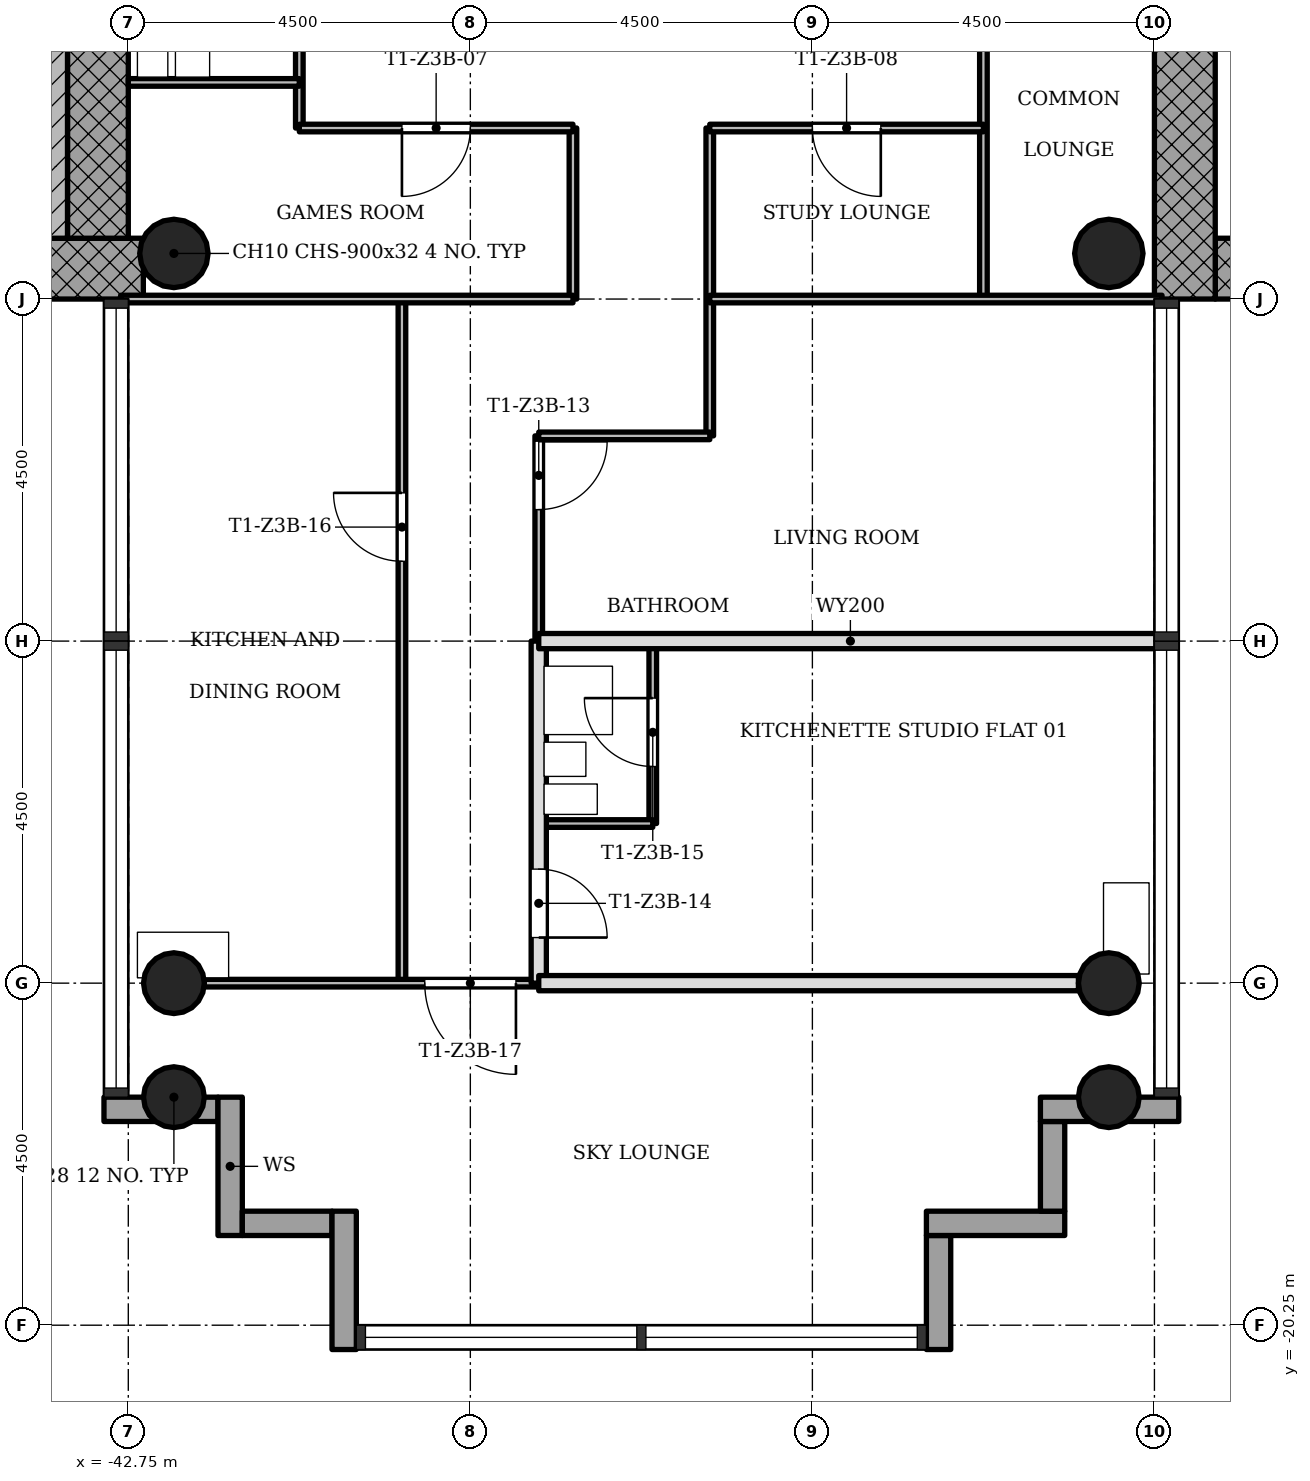
"""IFC4 building model, lengths in metres.
Left out: names, types, materials, properties, quantities, classifications, styles, units other than length and angle.
Written with IfcOpenShell. Run it as: python <this file> out.ifc"""

import sys

from ifc_helpers import new_model, si_unit, direction, frame, frame_2d, origin, origin_2d, place, context, subcontext, project, spatial, rectangle, hollow_circle, extrude, element, fill, save


model = new_model("IFC4")
c1 = context("Model", 3, precision=1e-05, world=origin(), true_north=direction((0.0, 1.0)))
c2 = subcontext(c1, "Body", "Model", "MODEL_VIEW")
j1 = project(units=[si_unit("LENGTHUNIT", "METRE"), si_unit("PLANEANGLEUNIT", "RADIAN")], contexts=[c1])
p1 = place(None, origin())
s1 = spatial("IfcSite", under=j1, at=p1, CompositionType="ELEMENT")
p2 = place(p1, origin())
s2 = spatial("IfcBuilding", under=s1, at=p2, CompositionType="ELEMENT")
p3 = place(p2, frame((0.0, 0.0, 147.3)))
s3 = spatial("IfcBuildingStorey", under=s2, at=p3, CompositionType="ELEMENT", Elevation=147.3)
p4 = place(p3, frame((-28.45, -6.35, 0.0), z_axis=(0.0, 0.0, 1.0), x_axis=(1.0, 0.0, 0.0)))
e1 = element("IfcWall", 1, at=p4, inside=s3, PredefinedType="SHEAR", context=c2, shape_type="SweptSolid", body=[
    extrude(rectangle(XDim=8.2, YDim=0.8, at=frame_2d((4.1, 0.0))), origin(), (0.0, 0.0, 1.0), 3.4),
])
p5 = place(p3, frame((-28.85, 5.95, 0.0), z_axis=(0.0, 0.0, 1.0), x_axis=(0.0, -1.0, 0.0)))
e2 = element("IfcWall", 2, at=p5, inside=s3, PredefinedType="SHEAR", context=c2, shape_type="SweptSolid", body=[
    extrude(rectangle(XDim=12.7, YDim=0.8, at=frame_2d((6.35, 0.0))), origin(), (0.0, 0.0, 1.0), 3.4),
])
p6 = place(p5, frame((5.05, 0.0, 0.0)))
e3 = element("IfcOpeningElement", 3, at=p6, cuts=e2, PredefinedType="OPENING", context=c2, shape_type="SweptSolid", body=[
    extrude(rectangle(XDim=1.8, YDim=2.1, at=frame_2d((0.9, 1.05))), frame((0.0, 0.41, 0.0), z_axis=(0.0, -1.0, 0.0), x_axis=(1.0, 0.0, 0.0)), (0.0, 0.0, 1.0), 0.82),
])
p7 = place(p3, frame((-50.95, -6.35, 0.0), z_axis=(0.0, 0.0, 1.0), x_axis=(1.0, 0.0, 0.0)))
e4 = element("IfcWall", 4, at=p7, inside=s3, PredefinedType="SHEAR", context=c2, shape_type="SweptSolid", body=[
    extrude(rectangle(XDim=8.398, YDim=0.8, at=frame_2d((4.199, 0.0))), origin(), (0.0, 0.0, 1.0), 3.4),
])
p8 = place(p3, frame((-43.15, -5.95, 0.0), z_axis=(0.0, 0.0, 1.0), x_axis=(0.0, 1.0, 0.0)))
e5 = element("IfcWall", 5, at=p8, inside=s3, PredefinedType="SHEAR", context=c2, shape_type="SweptSolid", body=[
    extrude(rectangle(XDim=12.7, YDim=0.8, at=frame_2d((6.35, 0.0))), origin(), (0.0, 0.0, 1.0), 3.4),
])
p9 = place(p8, frame((5.05, 0.0, 0.0)))
e6 = element("IfcOpeningElement", 6, at=p9, cuts=e5, PredefinedType="OPENING", context=c2, shape_type="SweptSolid", body=[
    extrude(rectangle(XDim=1.8, YDim=2.1, at=frame_2d((0.9, 1.05))), frame((0.0, 0.41, 0.0), z_axis=(0.0, -1.0, 0.0), x_axis=(1.0, 0.0, 0.0)), (0.0, 0.0, 1.0), 0.82),
])
for number, where, z_axis, x_axis in (
    (7, (-42.15, -15.75, 0.0), (0.0, 0.0, 1.0), (1.0, 0.0, 0.0)),
    (8, (-29.85, -15.75, 0.0), (0.0, 0.0, 1.0), (1.0, 0.0, 0.0)),
    (9, (-42.15, -17.25, 0.0), (0.0, 0.0, 1.0), (1.0, 0.0, 0.0)),
    (10, (-29.85, -17.25, 0.0), (0.0, 0.0, 1.0), (1.0, 0.0, 0.0)),
):
    element("IfcColumn", number, at=place(p3, frame(where, z_axis=z_axis, x_axis=x_axis)), inside=s3, PredefinedType="COLUMN", context=c2, shape_type="SweptSolid", body=[
        extrude(hollow_circle(Radius=0.4, WallThickness=0.028, at=origin_2d()), origin(), (0.0, 0.0, 1.0), 3.4),
    ])
for number, where, z_axis, x_axis in (
    (11, (-42.15, -6.15, 0.0), (0.0, 0.0, 1.0), (1.0, 0.0, 0.0)),
    (12, (-29.85, -6.15, 0.0), (0.0, 0.0, 1.0), (1.0, 0.0, 0.0)),
):
    element("IfcColumn", number, at=place(p3, frame(where, z_axis=z_axis, x_axis=x_axis)), inside=s3, PredefinedType="COLUMN", context=c2, shape_type="SweptSolid", body=[
        extrude(hollow_circle(Radius=0.45, WallThickness=0.032, at=origin_2d()), origin(), (0.0, 0.0, 1.0), 3.4),
    ])
p10 = place(p3, frame((-43.07, -17.41, -0.3), z_axis=(0.0, 0.0, 1.0), x_axis=(1.0, 0.0, 0.0)))
e13 = element("IfcWall", 13, at=p10, inside=s3, PredefinedType="STANDARD", context=c2, shape_type="SweptSolid", body=[
    extrude(rectangle(XDim=1.5, YDim=0.32, at=frame_2d((0.75, 0.0))), origin(), (0.0, 0.0, 1.0), 3.4),
])
p11 = place(p3, frame((-41.41, -17.25, -0.3), z_axis=(0.0, 0.0, 1.0), x_axis=(0.0, -1.0, 0.0)))
e14 = element("IfcWall", 14, at=p11, inside=s3, PredefinedType="STANDARD", context=c2, shape_type="SweptSolid", body=[
    extrude(rectangle(XDim=1.82, YDim=0.32, at=frame_2d((0.91, 0.0))), origin(), (0.0, 0.0, 1.0), 3.4),
])
p12 = place(p3, frame((-41.25, -18.91, -0.3), z_axis=(0.0, 0.0, 1.0), x_axis=(1.0, 0.0, 0.0)))
e15 = element("IfcWall", 15, at=p12, inside=s3, PredefinedType="STANDARD", context=c2, shape_type="SweptSolid", body=[
    extrude(rectangle(XDim=1.18, YDim=0.32, at=frame_2d((0.59, 0.0))), origin(), (0.0, 0.0, 1.0), 3.4),
])
p13 = place(p3, frame((-39.91, -18.75, -0.3), z_axis=(0.0, 0.0, 1.0), x_axis=(0.0, -1.0, 0.0)))
e16 = element("IfcWall", 16, at=p13, inside=s3, PredefinedType="STANDARD", context=c2, shape_type="SweptSolid", body=[
    extrude(rectangle(XDim=1.82, YDim=0.32, at=frame_2d((0.91, 0.0))), origin(), (0.0, 0.0, 1.0), 3.4),
])
p14 = place(p3, frame((-32.09, -20.57, -0.3), z_axis=(0.0, 0.0, 1.0), x_axis=(0.0, 1.0, 0.0)))
e17 = element("IfcWall", 17, at=p14, inside=s3, PredefinedType="STANDARD", context=c2, shape_type="SweptSolid", body=[
    extrude(rectangle(XDim=1.5, YDim=0.32, at=frame_2d((0.75, 0.0))), origin(), (0.0, 0.0, 1.0), 3.4),
])
p15 = place(p3, frame((-32.25, -18.91, -0.3), z_axis=(0.0, 0.0, 1.0), x_axis=(1.0, 0.0, 0.0)))
e18 = element("IfcWall", 18, at=p15, inside=s3, PredefinedType="STANDARD", context=c2, shape_type="SweptSolid", body=[
    extrude(rectangle(XDim=1.82, YDim=0.32, at=frame_2d((0.91, 0.0))), origin(), (0.0, 0.0, 1.0), 3.4),
])
p16 = place(p3, frame((-30.59, -18.75, -0.3), z_axis=(0.0, 0.0, 1.0), x_axis=(0.0, 1.0, 0.0)))
e19 = element("IfcWall", 19, at=p16, inside=s3, PredefinedType="STANDARD", context=c2, shape_type="SweptSolid", body=[
    extrude(rectangle(XDim=1.18, YDim=0.32, at=frame_2d((0.59, 0.0))), origin(), (0.0, 0.0, 1.0), 3.4),
])
p17 = place(p3, frame((-30.75, -17.41, -0.3), z_axis=(0.0, 0.0, 1.0), x_axis=(1.0, 0.0, 0.0)))
e20 = element("IfcWall", 20, at=p17, inside=s3, PredefinedType="STANDARD", context=c2, shape_type="SweptSolid", body=[
    extrude(rectangle(XDim=1.82, YDim=0.32, at=frame_2d((0.91, 0.0))), origin(), (0.0, 0.0, 1.0), 3.4),
])
p18 = place(p3, frame((-40.5, -4.5, 0.0), z_axis=(0.0, 0.0, 1.0), x_axis=(0.0, 1.0, 0.0)))
e21 = element("IfcWall", 21, at=p18, inside=s3, PredefinedType="PARTITIONING", context=c2, shape_type="SweptSolid", body=[
    extrude(rectangle(XDim=3.0, YDim=0.1, at=frame_2d((1.5, 0.0))), origin(), (0.0, 0.0, 1.0), 3.0),
])
p19 = place(p3, frame((-39.15, -15.75, 0.0), z_axis=(0.0, 0.0, 1.0), x_axis=(0.0, 1.0, 0.0)))
e22 = element("IfcWall", 22, at=p19, inside=s3, PredefinedType="PARTITIONING", context=c2, shape_type="SweptSolid", body=[
    extrude(rectangle(XDim=9.0, YDim=0.1, at=frame_2d((4.5, 0.0))), origin(), (0.0, 0.0, 1.0), 3.0),
])
p20 = place(p19, frame((5.55, 0.0, 0.0)))
e23 = element("IfcOpeningElement", 23, at=p20, cuts=e22, PredefinedType="OPENING", context=c2, shape_type="SweptSolid", body=[
    extrude(rectangle(XDim=0.9, YDim=2.1, at=frame_2d((0.45, 1.05))), frame((0.0, 0.06, 0.0), z_axis=(0.0, -1.0, 0.0), x_axis=(1.0, 0.0, 0.0)), (0.0, 0.0, 1.0), 0.12),
])
p21 = place(p3, frame((-37.35, -11.25, 0.0), z_axis=(0.0, 0.0, 1.0), x_axis=(0.0, 1.0, 0.0)))
e24 = element("IfcWall", 24, at=p21, inside=s3, PredefinedType="PARTITIONING", context=c2, shape_type="SweptSolid", body=[
    extrude(rectangle(XDim=2.7, YDim=0.1, at=frame_2d((1.35, 0.0))), origin(), (0.0, 0.0, 1.0), 3.0),
])
p22 = place(p21, frame((1.73, 0.0, 0.0)))
e25 = element("IfcOpeningElement", 25, at=p22, cuts=e24, PredefinedType="OPENING", context=c2, shape_type="SweptSolid", body=[
    extrude(rectangle(XDim=0.9, YDim=2.1, at=frame_2d((0.45, 1.05))), frame((0.0, 0.06, 0.0), z_axis=(0.0, -1.0, 0.0), x_axis=(1.0, 0.0, 0.0)), (0.0, 0.0, 1.0), 0.12),
])
p23 = place(p3, frame((-37.35, -15.75, 0.0), z_axis=(0.0, 0.0, 1.0), x_axis=(0.0, 1.0, 0.0)))
e26 = element("IfcWall", 26, at=p23, inside=s3, PredefinedType="SOLIDWALL", context=c2, shape_type="SweptSolid", body=[
    extrude(rectangle(XDim=4.5, YDim=0.2, at=frame_2d((2.25, 0.0))), origin(), (0.0, 0.0, 1.0), 3.0),
])
p24 = place(p23, frame((0.6, 0.0, 0.0)))
e27 = element("IfcOpeningElement", 27, at=p24, cuts=e26, PredefinedType="OPENING", context=c2, shape_type="SweptSolid", body=[
    extrude(rectangle(XDim=0.9, YDim=2.1, at=frame_2d((0.45, 1.05))), frame((0.0, 0.11, 0.0), z_axis=(0.0, -1.0, 0.0), x_axis=(1.0, 0.0, 0.0)), (0.0, 0.0, 1.0), 0.22),
])
p25 = place(p3, frame((-36.9, -6.75, 0.0), z_axis=(0.0, 0.0, 1.0), x_axis=(0.0, 1.0, 0.0)))
e28 = element("IfcWall", 28, at=p25, inside=s3, PredefinedType="PARTITIONING", context=c2, shape_type="SweptSolid", body=[
    extrude(rectangle(XDim=2.25, YDim=0.1, at=frame_2d((1.125, 0.0))), origin(), (0.0, 0.0, 1.0), 3.0),
])
p26 = place(p3, frame((-35.85, -13.65, 0.0), z_axis=(0.0, 0.0, 1.0), x_axis=(0.0, 1.0, 0.0)))
e29 = element("IfcWall", 29, at=p26, inside=s3, PredefinedType="PARTITIONING", context=c2, shape_type="SweptSolid", body=[
    extrude(rectangle(XDim=2.4, YDim=0.1, at=frame_2d((1.2, 0.0))), origin(), (0.0, 0.0, 1.0), 3.0),
])
p27 = place(p26, frame((0.75, 0.0, 0.0)))
e30 = element("IfcOpeningElement", 30, at=p27, cuts=e29, PredefinedType="OPENING", context=c2, shape_type="SweptSolid", body=[
    extrude(rectangle(XDim=0.9, YDim=2.1, at=frame_2d((0.45, 1.05))), frame((0.0, 0.06, 0.0), z_axis=(0.0, -1.0, 0.0), x_axis=(1.0, 0.0, 0.0)), (0.0, 0.0, 1.0), 0.12),
])
p28 = place(p3, frame((-35.1, -8.55, 0.0), z_axis=(0.0, 0.0, 1.0), x_axis=(0.0, 1.0, 0.0)))
e31 = element("IfcWall", 31, at=p28, inside=s3, PredefinedType="PARTITIONING", context=c2, shape_type="SweptSolid", body=[
    extrude(rectangle(XDim=4.05, YDim=0.1, at=frame_2d((2.025, 0.0))), origin(), (0.0, 0.0, 1.0), 3.0),
])
p29 = place(p3, frame((-31.5, -6.75, 0.0), z_axis=(0.0, 0.0, 1.0), x_axis=(0.0, 1.0, 0.0)))
e32 = element("IfcWall", 32, at=p29, inside=s3, PredefinedType="PARTITIONING", context=c2, shape_type="SweptSolid", body=[
    extrude(rectangle(XDim=5.25, YDim=0.1, at=frame_2d((2.625, 0.0))), origin(), (0.0, 0.0, 1.0), 3.0),
])
p30 = place(p29, frame((3.3, 0.0, 0.0)))
e33 = element("IfcOpeningElement", 33, at=p30, cuts=e32, PredefinedType="OPENING", context=c2, shape_type="SweptSolid", body=[
    extrude(rectangle(XDim=0.9, YDim=2.1, at=frame_2d((0.45, 1.05))), frame((0.0, 0.06, 0.0), z_axis=(0.0, -1.0, 0.0), x_axis=(1.0, 0.0, 0.0)), (0.0, 0.0, 1.0), 0.12),
])
p31 = place(p3, frame((-41.75, -15.75, 0.0), z_axis=(0.0, 0.0, 1.0), x_axis=(1.0, 0.0, 0.0)))
e34 = element("IfcWall", 34, at=p31, inside=s3, PredefinedType="PARTITIONING", context=c2, shape_type="SweptSolid", body=[
    extrude(rectangle(XDim=4.4, YDim=0.1, at=frame_2d((2.2, 0.0))), origin(), (0.0, 0.0, 1.0), 3.0),
])
p32 = place(p31, frame((2.9, 0.0, 0.0)))
e35 = element("IfcOpeningElement", 35, at=p32, cuts=e34, PredefinedType="OPENING", context=c2, shape_type="SweptSolid", body=[
    extrude(rectangle(XDim=1.2, YDim=2.1, at=frame_2d((0.6, 1.05))), frame((0.0, 0.06, 0.0), z_axis=(0.0, -1.0, 0.0), x_axis=(1.0, 0.0, 0.0)), (0.0, 0.0, 1.0), 0.12),
])
p33 = place(p3, frame((-37.35, -15.75, 0.0), z_axis=(0.0, 0.0, 1.0), x_axis=(1.0, 0.0, 0.0)))
e36 = element("IfcWall", 36, at=p33, inside=s3, PredefinedType="SOLIDWALL", context=c2, shape_type="SweptSolid", body=[
    extrude(rectangle(XDim=7.1, YDim=0.2, at=frame_2d((3.55, 0.0))), origin(), (0.0, 0.0, 1.0), 3.0),
])
p34 = place(p3, frame((-37.35, -13.65, 0.0), z_axis=(0.0, 0.0, 1.0), x_axis=(1.0, 0.0, 0.0)))
e37 = element("IfcWall", 37, at=p34, inside=s3, PredefinedType="PARTITIONING", context=c2, shape_type="SweptSolid", body=[
    extrude(rectangle(XDim=1.5, YDim=0.1, at=frame_2d((0.75, 0.0))), origin(), (0.0, 0.0, 1.0), 3.0),
])
p35 = place(p3, frame((-37.35, -11.25, 0.0), z_axis=(0.0, 0.0, 1.0), x_axis=(1.0, 0.0, 0.0)))
e38 = element("IfcWall", 38, at=p35, inside=s3, PredefinedType="SOLIDWALL", context=c2, shape_type="SweptSolid", body=[
    extrude(rectangle(XDim=8.2, YDim=0.2, at=frame_2d((4.1, 0.0))), origin(), (0.0, 0.0, 1.0), 3.0),
])
p36 = place(p3, frame((-37.35, -8.55, 0.0), z_axis=(0.0, 0.0, 1.0), x_axis=(1.0, 0.0, 0.0)))
e39 = element("IfcWall", 39, at=p36, inside=s3, PredefinedType="PARTITIONING", context=c2, shape_type="SweptSolid", body=[
    extrude(rectangle(XDim=2.25, YDim=0.1, at=frame_2d((1.125, 0.0))), origin(), (0.0, 0.0, 1.0), 3.0),
])
for number, where, z_axis, x_axis in (
    (40, (-42.85, -6.75, 0.0), (0.0, 0.0, 1.0), (1.0, 0.0, 0.0)),
    (41, (-35.1, -6.75, 0.0), (0.0, 0.0, 1.0), (1.0, 0.0, 0.0)),
):
    element("IfcWall", number, at=place(p3, frame(where, z_axis=z_axis, x_axis=x_axis)), inside=s3, PredefinedType="PARTITIONING", context=c2, shape_type="SweptSolid", body=[
        extrude(rectangle(XDim=5.95, YDim=0.1, at=frame_2d((2.975, 0.0))), origin(), (0.0, 0.0, 1.0), 3.0),
    ])
p37 = place(p3, frame((-40.5, -4.5, 0.0), z_axis=(0.0, 0.0, 1.0), x_axis=(1.0, 0.0, 0.0)))
e42 = element("IfcWall", 42, at=p37, inside=s3, PredefinedType="PARTITIONING", context=c2, shape_type="SweptSolid", body=[
    extrude(rectangle(XDim=3.6, YDim=0.1, at=frame_2d((1.8, 0.0))), origin(), (0.0, 0.0, 1.0), 3.0),
])
p38 = place(p37, frame((1.35, 0.0, 0.0)))
e43 = element("IfcOpeningElement", 43, at=p38, cuts=e42, PredefinedType="OPENING", context=c2, shape_type="SweptSolid", body=[
    extrude(rectangle(XDim=0.9, YDim=2.1, at=frame_2d((0.45, 1.05))), frame((0.0, 0.06, 0.0), z_axis=(0.0, -1.0, 0.0), x_axis=(1.0, 0.0, 0.0)), (0.0, 0.0, 1.0), 0.12),
])
p39 = place(p3, frame((-35.1, -4.5, 0.0), z_axis=(0.0, 0.0, 1.0), x_axis=(1.0, 0.0, 0.0)))
e44 = element("IfcWall", 44, at=p39, inside=s3, PredefinedType="PARTITIONING", context=c2, shape_type="SweptSolid", body=[
    extrude(rectangle(XDim=3.6, YDim=0.1, at=frame_2d((1.8, 0.0))), origin(), (0.0, 0.0, 1.0), 3.0),
])
p40 = place(p39, frame((1.35, 0.0, 0.0)))
e45 = element("IfcOpeningElement", 45, at=p40, cuts=e44, PredefinedType="OPENING", context=c2, shape_type="SweptSolid", body=[
    extrude(rectangle(XDim=0.9, YDim=2.1, at=frame_2d((0.45, 1.05))), frame((0.0, 0.06, 0.0), z_axis=(0.0, -1.0, 0.0), x_axis=(1.0, 0.0, 0.0)), (0.0, 0.0, 1.0), 0.12),
])
p41 = place(p3, frame((-42.75, -3.9, 0.0), z_axis=(0.0, 0.0, 1.0), x_axis=(1.0, 0.0, 0.0)))
e46 = element("IfcWall", 46, at=p41, inside=s3, PredefinedType="PARTITIONING", context=c2, shape_type="SweptSolid", body=[
    extrude(rectangle(XDim=2.25, YDim=0.1, at=frame_2d((1.125, 0.0))), origin(), (0.0, 0.0, 1.0), 3.0),
])
p42 = place(p3, frame((-43.75, -1.85, 0.0), z_axis=(0.0, 0.0, 1.0), x_axis=(0.0, -1.0, 0.0)))
e47 = element("IfcWall", 47, at=p42, inside=s3, PredefinedType="SHEAR", context=c2, shape_type="SweptSolid", body=[
    extrude(rectangle(XDim=4.1, YDim=0.4, at=frame_2d((2.05, 0.0))), origin(), (0.0, 0.0, 1.0), 3.4),
])
p43 = place(p38, origin())
e48 = element("IfcDoor", 48, at=p43, inside=s3, OperationType="SINGLE_SWING_LEFT", PredefinedType="DOOR", context=c2, shape_type="SweptSolid", body=[
    extrude(rectangle(XDim=0.9, YDim=2.1, at=frame_2d((0.45, 1.05))), frame((0.0, 0.025, 0.0), z_axis=(0.0, -1.0, 0.0), x_axis=(1.0, 0.0, 0.0)), (0.0, 0.0, 1.0), 0.05),
])
fill(e43, e48)
p44 = place(p40, origin())
e49 = element("IfcDoor", 49, at=p44, inside=s3, OperationType="SINGLE_SWING_RIGHT", PredefinedType="DOOR", context=c2, shape_type="SweptSolid", body=[
    extrude(rectangle(XDim=0.9, YDim=2.1, at=frame_2d((0.45, 1.05))), frame((0.0, 0.025, 0.0), z_axis=(0.0, -1.0, 0.0), x_axis=(1.0, 0.0, 0.0)), (0.0, 0.0, 1.0), 0.05),
])
fill(e45, e49)
p45 = place(p22, origin())
e50 = element("IfcDoor", 50, at=p45, inside=s3, OperationType="SINGLE_SWING_RIGHT", PredefinedType="DOOR", context=c2, shape_type="SweptSolid", body=[
    extrude(rectangle(XDim=0.9, YDim=2.1, at=frame_2d((0.45, 1.05))), frame((0.0, 0.025, 0.0), z_axis=(0.0, -1.0, 0.0), x_axis=(1.0, 0.0, 0.0)), (0.0, 0.0, 1.0), 0.05),
])
fill(e25, e50)
p46 = place(p24, origin())
e51 = element("IfcDoor", 51, at=p46, inside=s3, OperationType="SINGLE_SWING_LEFT", PredefinedType="DOOR", context=c2, shape_type="SweptSolid", body=[
    extrude(rectangle(XDim=0.9, YDim=2.1, at=frame_2d((0.45, 1.05))), frame((0.0, 0.025, 0.0), z_axis=(0.0, -1.0, 0.0), x_axis=(1.0, 0.0, 0.0)), (0.0, 0.0, 1.0), 0.05),
])
fill(e27, e51)
p47 = place(p27, origin())
e52 = element("IfcDoor", 52, at=p47, inside=s3, OperationType="SINGLE_SWING_LEFT", PredefinedType="DOOR", context=c2, shape_type="SweptSolid", body=[
    extrude(rectangle(XDim=0.9, YDim=2.1, at=frame_2d((0.45, 1.05))), frame((0.0, 0.025, 0.0), z_axis=(0.0, -1.0, 0.0), x_axis=(1.0, 0.0, 0.0)), (0.0, 0.0, 1.0), 0.05),
])
fill(e30, e52)
p48 = place(p20, origin())
e53 = element("IfcDoor", 53, at=p48, inside=s3, OperationType="SINGLE_SWING_LEFT", PredefinedType="DOOR", context=c2, shape_type="SweptSolid", body=[
    extrude(rectangle(XDim=0.9, YDim=2.1, at=frame_2d((0.45, 1.05))), frame((0.0, 0.025, 0.0), z_axis=(0.0, -1.0, 0.0), x_axis=(1.0, 0.0, 0.0)), (0.0, 0.0, 1.0), 0.05),
])
fill(e23, e53)
p49 = place(p32, origin())
e54 = element("IfcDoor", 54, at=p49, inside=s3, OperationType="SINGLE_SWING_RIGHT", PredefinedType="DOOR", context=c2, shape_type="SweptSolid", body=[
    extrude(rectangle(XDim=1.2, YDim=2.1, at=frame_2d((0.6, 1.05))), frame((0.0, 0.025, 0.0), z_axis=(0.0, -1.0, 0.0), x_axis=(1.0, 0.0, 0.0)), (0.0, 0.0, 1.0), 0.05),
])
fill(e35, e54)
save(model, sys.argv[1])
